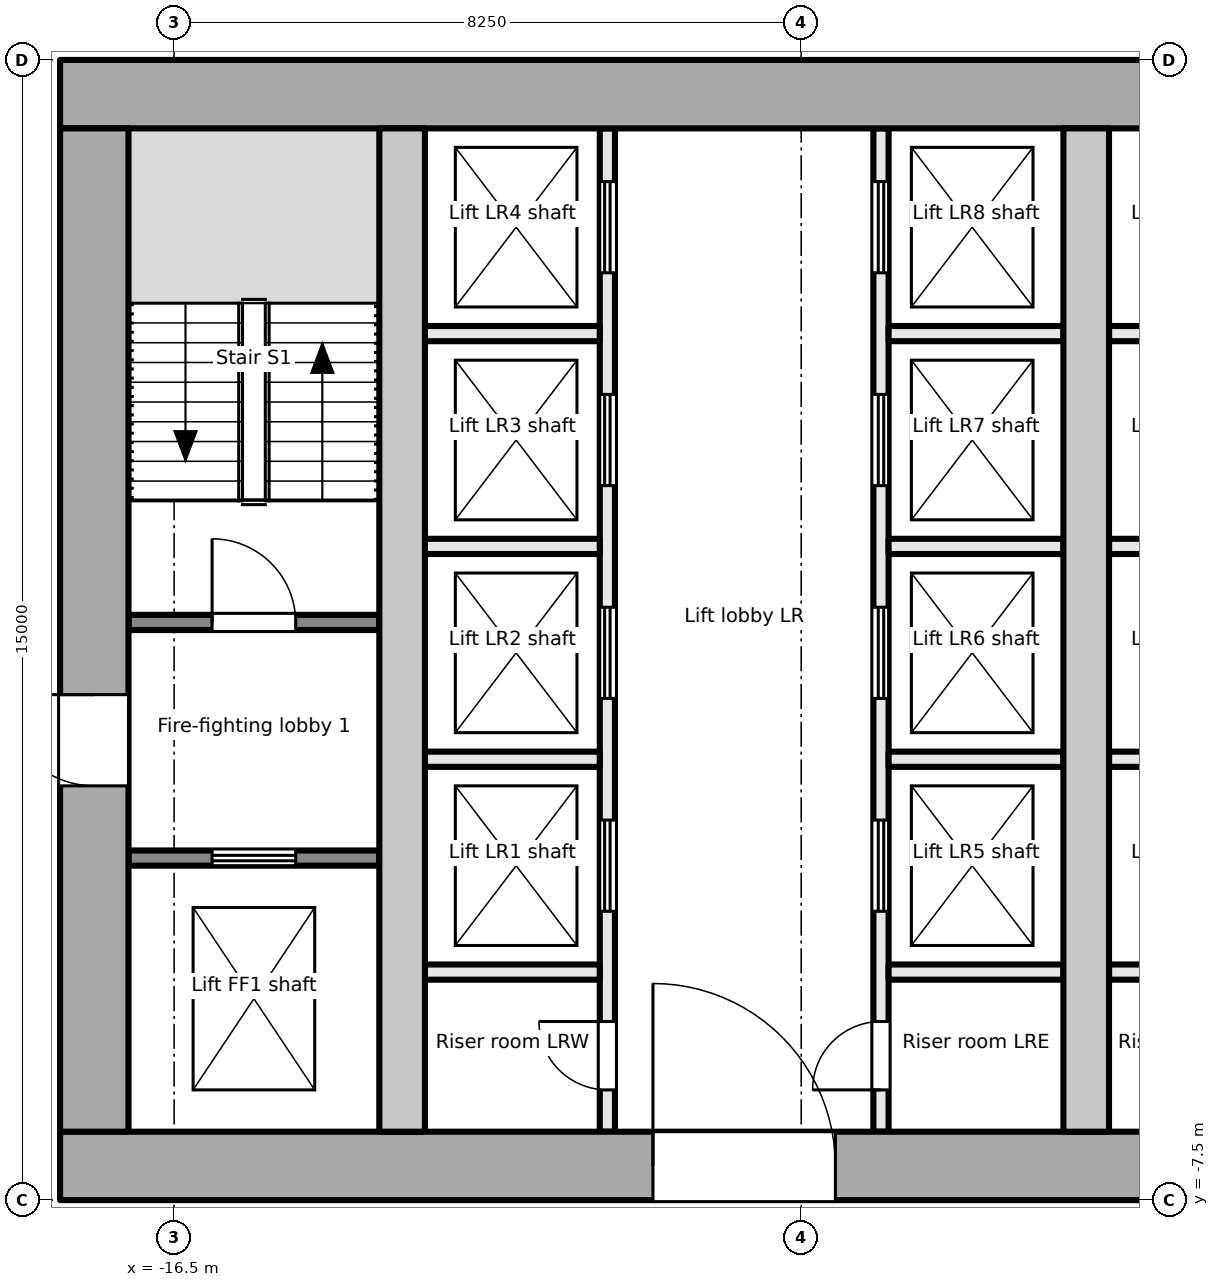
"""IFC4 building model, lengths in metres.
Left out: names, types, materials, properties, quantities, classifications, styles, units other than length and angle.
Written with IfcOpenShell. Run it as: python <this file> out.ifc"""

import sys

from ifc_helpers import new_model, si_unit, direction, frame, frame_2d, origin, place, context, subcontext, project, spatial, rectangle, extrude, element, fill, save


model = new_model("IFC4")
c1 = context("Model", 3, precision=1e-05, world=origin(), true_north=direction((0.0, 1.0)))
c2 = subcontext(c1, "Body", "Model", "MODEL_VIEW")
j1 = project(units=[si_unit("LENGTHUNIT", "METRE"), si_unit("PLANEANGLEUNIT", "RADIAN")], contexts=[c1])
p1 = place(None, origin())
s1 = spatial("IfcSite", under=j1, at=p1, CompositionType="ELEMENT")
p2 = place(p1, origin())
s2 = spatial("IfcBuilding", under=s1, at=p2, CompositionType="ELEMENT")
p3 = place(p2, frame((0.0, 0.0, 32.4)))
s3 = spatial("IfcBuildingStorey", under=s2, at=p3, CompositionType="ELEMENT", Elevation=32.4)
p4 = place(p3, frame((-18.0, -7.05, -0.2), z_axis=(0.0, 0.0, 1.0), x_axis=(1.0, 0.0, 0.0)))
e1 = element("IfcWall", 1, at=p4, inside=s3, PredefinedType="SHEAR", context=c2, shape_type="SweptSolid", body=[
    extrude(rectangle(XDim=36.0, YDim=0.9, at=frame_2d((18.0, 0.0))), origin(), (0.0, 0.0, 1.0), 4.1),
])
p5 = place(p4, frame((7.8, 0.0, 0.2)))
e2 = element("IfcOpeningElement", 2, at=p5, cuts=e1, PredefinedType="OPENING", context=c2, shape_type="SweptSolid", body=[
    extrude(rectangle(XDim=2.4, YDim=2.1, at=frame_2d((1.2, 1.05))), frame((0.0, 0.46, 0.0), z_axis=(0.0, -1.0, 0.0), x_axis=(1.0, 0.0, 0.0)), (0.0, 0.0, 1.0), 0.921),
])
p6 = place(p4, frame((17.4, 0.0, 0.2)))
e3 = element("IfcOpeningElement", 3, at=p6, cuts=e1, PredefinedType="OPENING", context=c2, shape_type="SweptSolid", body=[
    extrude(rectangle(XDim=1.2, YDim=2.1, at=frame_2d((0.6, 1.05))), frame((0.0, 0.46, 0.0), z_axis=(0.0, -1.0, 0.0), x_axis=(1.0, 0.0, 0.0)), (0.0, 0.0, 1.0), 0.921),
])
p7 = place(p4, frame((26.1, 0.0, 0.2)))
e4 = element("IfcOpeningElement", 4, at=p7, cuts=e1, PredefinedType="OPENING", context=c2, shape_type="SweptSolid", body=[
    extrude(rectangle(XDim=2.4, YDim=2.1, at=frame_2d((1.2, 1.05))), frame((0.0, 0.46, 0.0), z_axis=(0.0, -1.0, 0.0), x_axis=(1.0, 0.0, 0.0)), (0.0, 0.0, 1.0), 0.921),
])
p8 = place(p3, frame((-18.0, 7.05, -0.2), z_axis=(0.0, 0.0, 1.0), x_axis=(1.0, 0.0, 0.0)))
e5 = element("IfcWall", 5, at=p8, inside=s3, PredefinedType="SHEAR", context=c2, shape_type="SweptSolid", body=[
    extrude(rectangle(XDim=36.0, YDim=0.9, at=frame_2d((18.0, 0.0))), origin(), (0.0, 0.0, 1.0), 4.1),
])
p9 = place(p3, frame((-17.55, -6.6, -0.2), z_axis=(0.0, 0.0, 1.0), x_axis=(0.0, 1.0, 0.0)))
e6 = element("IfcWall", 6, at=p9, inside=s3, PredefinedType="SHEAR", context=c2, shape_type="SweptSolid", body=[
    extrude(rectangle(XDim=13.2, YDim=0.9, at=frame_2d((6.6, 0.0))), origin(), (0.0, 0.0, 1.0), 4.1),
])
p10 = place(p9, frame((4.55, 0.0, 0.2)))
e7 = element("IfcOpeningElement", 7, at=p10, cuts=e6, PredefinedType="OPENING", context=c2, shape_type="SweptSolid", body=[
    extrude(rectangle(XDim=1.2, YDim=2.1, at=frame_2d((0.6, 1.05))), frame((0.0, 0.46, 0.0), z_axis=(0.0, -1.0, 0.0), x_axis=(1.0, 0.0, 0.0)), (0.0, 0.0, 1.0), 0.921),
])
for number, where, z_axis, x_axis in (
    (8, (-13.5, -6.6, -0.2), (0.0, 0.0, 1.0), (0.0, 1.0, 0.0)),
    (9, (-4.5, -6.6, -0.2), (0.0, 0.0, 1.0), (0.0, 1.0, 0.0)),
):
    element("IfcWall", number, at=place(p3, frame(where, z_axis=z_axis, x_axis=x_axis)), inside=s3, PredefinedType="SHEAR", context=c2, shape_type="SweptSolid", body=[
        extrude(rectangle(XDim=13.2, YDim=0.6, at=frame_2d((6.6, 0.0))), origin(), (0.0, 0.0, 1.0), 4.1),
    ])
p11 = place(p3, frame((-17.1, -3.0, 0.0), z_axis=(0.0, 0.0, 1.0), x_axis=(1.0, 0.0, 0.0)))
e10 = element("IfcWall", 10, at=p11, inside=s3, PredefinedType="PARTITIONING", context=c2, shape_type="SweptSolid", body=[
    extrude(rectangle(XDim=3.3, YDim=0.2, at=frame_2d((1.65, 0.0))), origin(), (0.0, 0.0, 1.0), 3.9),
])
p12 = place(p11, frame((1.1, 0.0, 0.0)))
e11 = element("IfcOpeningElement", 11, at=p12, cuts=e10, PredefinedType="OPENING", context=c2, shape_type="SweptSolid", body=[
    extrude(rectangle(XDim=1.1, YDim=2.1, at=frame_2d((0.55, 1.05))), frame((0.0, 0.111, 0.0), z_axis=(0.0, -1.0, 0.0), x_axis=(1.0, 0.0, 0.0)), (0.0, 0.0, 1.0), 0.221),
])
p13 = place(p3, frame((-17.1, 0.1, 0.0), z_axis=(0.0, 0.0, 1.0), x_axis=(1.0, 0.0, 0.0)))
e12 = element("IfcWall", 12, at=p13, inside=s3, PredefinedType="PARTITIONING", context=c2, shape_type="SweptSolid", body=[
    extrude(rectangle(XDim=3.3, YDim=0.2, at=frame_2d((1.65, 0.0))), origin(), (0.0, 0.0, 1.0), 3.9),
])
p14 = place(p13, frame((1.1, 0.0, 0.0)))
e13 = element("IfcOpeningElement", 13, at=p14, cuts=e12, PredefinedType="OPENING", context=c2, shape_type="SweptSolid", body=[
    extrude(rectangle(XDim=1.1, YDim=2.1, at=frame_2d((0.55, 1.05))), frame((0.0, 0.111, 0.0), z_axis=(0.0, -1.0, 0.0), x_axis=(1.0, 0.0, 0.0)), (0.0, 0.0, 1.0), 0.221),
])
p15 = place(p3, frame((-10.8, -6.6, 0.0), z_axis=(0.0, 0.0, 1.0), x_axis=(0.0, 1.0, 0.0)))
e14 = element("IfcWall", 14, at=p15, inside=s3, PredefinedType="PARTITIONING", context=c2, shape_type="SweptSolid", body=[
    extrude(rectangle(XDim=13.2, YDim=0.2, at=frame_2d((6.6, 0.0))), origin(), (0.0, 0.0, 1.0), 3.9),
])
p16 = place(p15, frame((0.55, 0.0, 0.0)))
e15 = element("IfcOpeningElement", 15, at=p16, cuts=e14, PredefinedType="OPENING", context=c2, shape_type="SweptSolid", body=[
    extrude(rectangle(XDim=0.9, YDim=2.1, at=frame_2d((0.45, 1.05))), frame((0.0, 0.111, 0.0), z_axis=(0.0, -1.0, 0.0), x_axis=(1.0, 0.0, 0.0)), (0.0, 0.0, 1.0), 0.221),
])
p17 = place(p15, frame((2.9, 0.0, 0.0)))
e16 = element("IfcOpeningElement", 16, at=p17, cuts=e14, PredefinedType="OPENING", context=c2, shape_type="SweptSolid", body=[
    extrude(rectangle(XDim=1.2, YDim=2.1, at=frame_2d((0.6, 1.05))), frame((0.0, 0.111, 0.0), z_axis=(0.0, -1.0, 0.0), x_axis=(1.0, 0.0, 0.0)), (0.0, 0.0, 1.0), 0.221),
])
p18 = place(p15, frame((5.7, 0.0, 0.0)))
e17 = element("IfcOpeningElement", 17, at=p18, cuts=e14, PredefinedType="OPENING", context=c2, shape_type="SweptSolid", body=[
    extrude(rectangle(XDim=1.2, YDim=2.1, at=frame_2d((0.6, 1.05))), frame((0.0, 0.111, 0.0), z_axis=(0.0, -1.0, 0.0), x_axis=(1.0, 0.0, 0.0)), (0.0, 0.0, 1.0), 0.221),
])
p19 = place(p15, frame((8.5, 0.0, 0.0)))
e18 = element("IfcOpeningElement", 18, at=p19, cuts=e14, PredefinedType="OPENING", context=c2, shape_type="SweptSolid", body=[
    extrude(rectangle(XDim=1.2, YDim=2.1, at=frame_2d((0.6, 1.05))), frame((0.0, 0.111, 0.0), z_axis=(0.0, -1.0, 0.0), x_axis=(1.0, 0.0, 0.0)), (0.0, 0.0, 1.0), 0.221),
])
p20 = place(p15, frame((11.3, 0.0, 0.0)))
e19 = element("IfcOpeningElement", 19, at=p20, cuts=e14, PredefinedType="OPENING", context=c2, shape_type="SweptSolid", body=[
    extrude(rectangle(XDim=1.2, YDim=2.1, at=frame_2d((0.6, 1.05))), frame((0.0, 0.111, 0.0), z_axis=(0.0, -1.0, 0.0), x_axis=(1.0, 0.0, 0.0)), (0.0, 0.0, 1.0), 0.221),
])
p21 = place(p3, frame((-7.2, -6.6, 0.0), z_axis=(0.0, 0.0, 1.0), x_axis=(0.0, 1.0, 0.0)))
e20 = element("IfcWall", 20, at=p21, inside=s3, PredefinedType="PARTITIONING", context=c2, shape_type="SweptSolid", body=[
    extrude(rectangle(XDim=13.2, YDim=0.2, at=frame_2d((6.6, 0.0))), origin(), (0.0, 0.0, 1.0), 3.9),
])
p22 = place(p21, frame((0.55, 0.0, 0.0)))
e21 = element("IfcOpeningElement", 21, at=p22, cuts=e20, PredefinedType="OPENING", context=c2, shape_type="SweptSolid", body=[
    extrude(rectangle(XDim=0.9, YDim=2.1, at=frame_2d((0.45, 1.05))), frame((0.0, 0.111, 0.0), z_axis=(0.0, -1.0, 0.0), x_axis=(1.0, 0.0, 0.0)), (0.0, 0.0, 1.0), 0.221),
])
p23 = place(p21, frame((2.9, 0.0, 0.0)))
e22 = element("IfcOpeningElement", 22, at=p23, cuts=e20, PredefinedType="OPENING", context=c2, shape_type="SweptSolid", body=[
    extrude(rectangle(XDim=1.2, YDim=2.1, at=frame_2d((0.6, 1.05))), frame((0.0, 0.111, 0.0), z_axis=(0.0, -1.0, 0.0), x_axis=(1.0, 0.0, 0.0)), (0.0, 0.0, 1.0), 0.221),
])
p24 = place(p21, frame((5.7, 0.0, 0.0)))
e23 = element("IfcOpeningElement", 23, at=p24, cuts=e20, PredefinedType="OPENING", context=c2, shape_type="SweptSolid", body=[
    extrude(rectangle(XDim=1.2, YDim=2.1, at=frame_2d((0.6, 1.05))), frame((0.0, 0.111, 0.0), z_axis=(0.0, -1.0, 0.0), x_axis=(1.0, 0.0, 0.0)), (0.0, 0.0, 1.0), 0.221),
])
p25 = place(p21, frame((8.5, 0.0, 0.0)))
e24 = element("IfcOpeningElement", 24, at=p25, cuts=e20, PredefinedType="OPENING", context=c2, shape_type="SweptSolid", body=[
    extrude(rectangle(XDim=1.2, YDim=2.1, at=frame_2d((0.6, 1.05))), frame((0.0, 0.111, 0.0), z_axis=(0.0, -1.0, 0.0), x_axis=(1.0, 0.0, 0.0)), (0.0, 0.0, 1.0), 0.221),
])
p26 = place(p21, frame((11.3, 0.0, 0.0)))
e25 = element("IfcOpeningElement", 25, at=p26, cuts=e20, PredefinedType="OPENING", context=c2, shape_type="SweptSolid", body=[
    extrude(rectangle(XDim=1.2, YDim=2.1, at=frame_2d((0.6, 1.05))), frame((0.0, 0.111, 0.0), z_axis=(0.0, -1.0, 0.0), x_axis=(1.0, 0.0, 0.0)), (0.0, 0.0, 1.0), 0.221),
])
for number, where, z_axis, x_axis in (
    (26, (-13.2, -1.7, 0.0), (0.0, 0.0, 1.0), (1.0, 0.0, 0.0)),
    (27, (-13.2, 1.1, 0.0), (0.0, 0.0, 1.0), (1.0, 0.0, 0.0)),
    (28, (-13.2, 3.9, 0.0), (0.0, 0.0, 1.0), (1.0, 0.0, 0.0)),
    (29, (-13.2, -4.5, 0.0), (0.0, 0.0, 1.0), (1.0, 0.0, 0.0)),
    (30, (-7.1, -1.7, 0.0), (0.0, 0.0, 1.0), (1.0, 0.0, 0.0)),
    (31, (-7.1, 1.1, 0.0), (0.0, 0.0, 1.0), (1.0, 0.0, 0.0)),
    (32, (-7.1, 3.9, 0.0), (0.0, 0.0, 1.0), (1.0, 0.0, 0.0)),
    (33, (-7.1, -4.5, 0.0), (0.0, 0.0, 1.0), (1.0, 0.0, 0.0)),
    (34, (-4.2, -1.7, 0.0), (0.0, 0.0, 1.0), (1.0, 0.0, 0.0)),
    (35, (-4.2, 1.1, 0.0), (0.0, 0.0, 1.0), (1.0, 0.0, 0.0)),
    (36, (-4.2, 3.9, 0.0), (0.0, 0.0, 1.0), (1.0, 0.0, 0.0)),
    (37, (-4.2, -4.5, 0.0), (0.0, 0.0, 1.0), (1.0, 0.0, 0.0)),
):
    element("IfcWall", number, at=place(p3, frame(where, z_axis=z_axis, x_axis=x_axis)), inside=s3, PredefinedType="PARTITIONING", context=c2, shape_type="SweptSolid", body=[
        extrude(rectangle(XDim=2.3, YDim=0.2, at=frame_2d((1.15, 0.0))), origin(), (0.0, 0.0, 1.0), 3.9),
    ])
p27 = place(p12, origin())
e38 = element("IfcDoor", 38, at=p27, inside=s3, OperationType="DOUBLE_DOOR_SLIDING", PredefinedType="DOOR", context=c2, shape_type="SweptSolid", body=[
    extrude(rectangle(XDim=1.1, YDim=2.1, at=frame_2d((0.55, 1.05))), frame((0.0, 0.025, 0.0), z_axis=(0.0, -1.0, 0.0), x_axis=(1.0, 0.0, 0.0)), (0.0, 0.0, 1.0), 0.05),
])
fill(e11, e38)
p28 = place(p10, origin())
e39 = element("IfcDoor", 39, at=p28, inside=s3, OperationType="SINGLE_SWING_RIGHT", PredefinedType="DOOR", context=c2, shape_type="SweptSolid", body=[
    extrude(rectangle(XDim=1.2, YDim=2.1, at=frame_2d((0.6, 1.05))), frame((0.0, 0.025, 0.0), z_axis=(0.0, -1.0, 0.0), x_axis=(1.0, 0.0, 0.0)), (0.0, 0.0, 1.0), 0.05),
])
fill(e7, e39)
p29 = place(p14, origin())
e40 = element("IfcDoor", 40, at=p29, inside=s3, OperationType="SINGLE_SWING_LEFT", PredefinedType="DOOR", context=c2, shape_type="SweptSolid", body=[
    extrude(rectangle(XDim=1.1, YDim=2.1, at=frame_2d((0.55, 1.05))), frame((0.0, 0.025, 0.0), z_axis=(0.0, -1.0, 0.0), x_axis=(1.0, 0.0, 0.0)), (0.0, 0.0, 1.0), 0.05),
])
fill(e13, e40)
p30 = place(p16, origin())
e41 = element("IfcDoor", 41, at=p30, inside=s3, OperationType="SINGLE_SWING_RIGHT", PredefinedType="DOOR", context=c2, shape_type="SweptSolid", body=[
    extrude(rectangle(XDim=0.9, YDim=2.1, at=frame_2d((0.45, 1.05))), frame((0.0, 0.025, 0.0), z_axis=(0.0, -1.0, 0.0), x_axis=(1.0, 0.0, 0.0)), (0.0, 0.0, 1.0), 0.05),
])
fill(e15, e41)
p31 = place(p17, origin())
e42 = element("IfcDoor", 42, at=p31, inside=s3, OperationType="DOUBLE_DOOR_SLIDING", PredefinedType="DOOR", context=c2, shape_type="SweptSolid", body=[
    extrude(rectangle(XDim=1.2, YDim=2.1, at=frame_2d((0.6, 1.05))), frame((0.0, 0.025, 0.0), z_axis=(0.0, -1.0, 0.0), x_axis=(1.0, 0.0, 0.0)), (0.0, 0.0, 1.0), 0.05),
])
fill(e16, e42)
p32 = place(p18, origin())
e43 = element("IfcDoor", 43, at=p32, inside=s3, OperationType="DOUBLE_DOOR_SLIDING", PredefinedType="DOOR", context=c2, shape_type="SweptSolid", body=[
    extrude(rectangle(XDim=1.2, YDim=2.1, at=frame_2d((0.6, 1.05))), frame((0.0, 0.025, 0.0), z_axis=(0.0, -1.0, 0.0), x_axis=(1.0, 0.0, 0.0)), (0.0, 0.0, 1.0), 0.05),
])
fill(e17, e43)
p33 = place(p19, origin())
e44 = element("IfcDoor", 44, at=p33, inside=s3, OperationType="DOUBLE_DOOR_SLIDING", PredefinedType="DOOR", context=c2, shape_type="SweptSolid", body=[
    extrude(rectangle(XDim=1.2, YDim=2.1, at=frame_2d((0.6, 1.05))), frame((0.0, 0.025, 0.0), z_axis=(0.0, -1.0, 0.0), x_axis=(1.0, 0.0, 0.0)), (0.0, 0.0, 1.0), 0.05),
])
fill(e18, e44)
p34 = place(p20, origin())
e45 = element("IfcDoor", 45, at=p34, inside=s3, OperationType="DOUBLE_DOOR_SLIDING", PredefinedType="DOOR", context=c2, shape_type="SweptSolid", body=[
    extrude(rectangle(XDim=1.2, YDim=2.1, at=frame_2d((0.6, 1.05))), frame((0.0, 0.025, 0.0), z_axis=(0.0, -1.0, 0.0), x_axis=(1.0, 0.0, 0.0)), (0.0, 0.0, 1.0), 0.05),
])
fill(e19, e45)
p35 = place(p22, origin())
e46 = element("IfcDoor", 46, at=p35, inside=s3, OperationType="SINGLE_SWING_LEFT", PredefinedType="DOOR", context=c2, shape_type="SweptSolid", body=[
    extrude(rectangle(XDim=0.9, YDim=2.1, at=frame_2d((0.45, 1.05))), frame((0.0, 0.025, 0.0), z_axis=(0.0, -1.0, 0.0), x_axis=(1.0, 0.0, 0.0)), (0.0, 0.0, 1.0), 0.05),
])
fill(e21, e46)
p36 = place(p23, origin())
e47 = element("IfcDoor", 47, at=p36, inside=s3, OperationType="DOUBLE_DOOR_SLIDING", PredefinedType="DOOR", context=c2, shape_type="SweptSolid", body=[
    extrude(rectangle(XDim=1.2, YDim=2.1, at=frame_2d((0.6, 1.05))), frame((0.0, 0.025, 0.0), z_axis=(0.0, -1.0, 0.0), x_axis=(1.0, 0.0, 0.0)), (0.0, 0.0, 1.0), 0.05),
])
fill(e22, e47)
p37 = place(p24, origin())
e48 = element("IfcDoor", 48, at=p37, inside=s3, OperationType="DOUBLE_DOOR_SLIDING", PredefinedType="DOOR", context=c2, shape_type="SweptSolid", body=[
    extrude(rectangle(XDim=1.2, YDim=2.1, at=frame_2d((0.6, 1.05))), frame((0.0, 0.025, 0.0), z_axis=(0.0, -1.0, 0.0), x_axis=(1.0, 0.0, 0.0)), (0.0, 0.0, 1.0), 0.05),
])
fill(e23, e48)
p38 = place(p25, origin())
e49 = element("IfcDoor", 49, at=p38, inside=s3, OperationType="DOUBLE_DOOR_SLIDING", PredefinedType="DOOR", context=c2, shape_type="SweptSolid", body=[
    extrude(rectangle(XDim=1.2, YDim=2.1, at=frame_2d((0.6, 1.05))), frame((0.0, 0.025, 0.0), z_axis=(0.0, -1.0, 0.0), x_axis=(1.0, 0.0, 0.0)), (0.0, 0.0, 1.0), 0.05),
])
fill(e24, e49)
p39 = place(p26, origin())
e50 = element("IfcDoor", 50, at=p39, inside=s3, OperationType="DOUBLE_DOOR_SLIDING", PredefinedType="DOOR", context=c2, shape_type="SweptSolid", body=[
    extrude(rectangle(XDim=1.2, YDim=2.1, at=frame_2d((0.6, 1.05))), frame((0.0, 0.025, 0.0), z_axis=(0.0, -1.0, 0.0), x_axis=(1.0, 0.0, 0.0)), (0.0, 0.0, 1.0), 0.05),
])
fill(e25, e50)
p40 = place(p5, origin())
e51 = element("IfcDoor", 51, at=p40, inside=s3, OperationType="DOUBLE_DOOR_DOUBLE_SWING", PredefinedType="DOOR", context=c2, shape_type="SweptSolid", body=[
    extrude(rectangle(XDim=2.4, YDim=2.1, at=frame_2d((1.2, 1.05))), frame((0.0, 0.025, 0.0), z_axis=(0.0, -1.0, 0.0), x_axis=(1.0, 0.0, 0.0)), (0.0, 0.0, 1.0), 0.05),
])
fill(e2, e51)
save(model, sys.argv[1])
